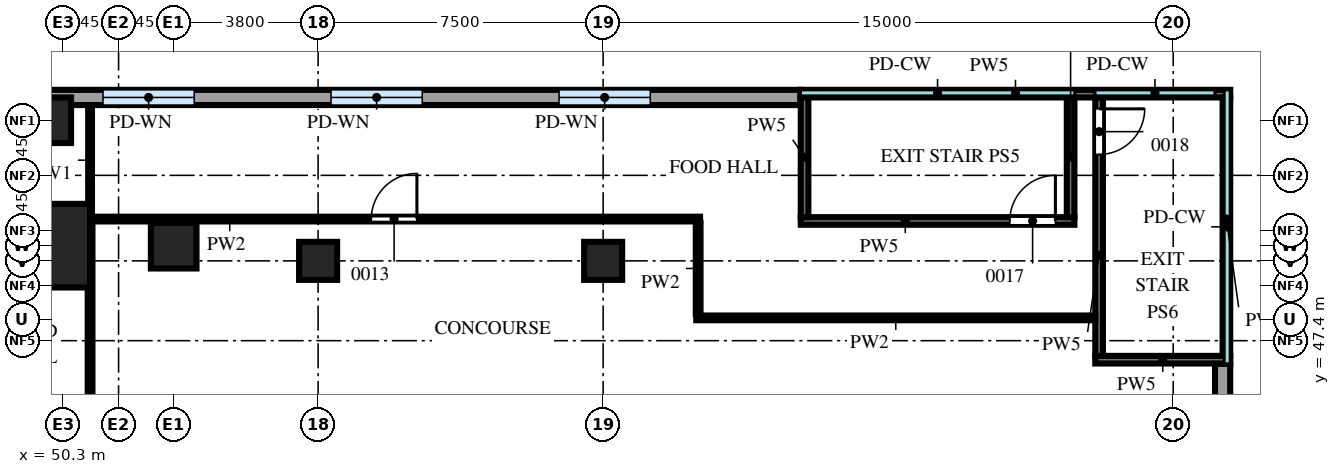
"""IFC4 building model, lengths in metres.
Left out: names, types, materials, properties, quantities, classifications, styles, units other than length and angle.
Written with IfcOpenShell. Run it as: python <this file> out.ifc"""

import sys

from ifc_helpers import new_model, si_unit, direction, frame, frame_2d, origin, origin_2d, place, context, subcontext, project, spatial, rectangle, extrude, source, transform, mapped, element, fill, save


model = new_model("IFC4")
c1 = context("Model", 3, precision=1e-05, world=origin(), true_north=direction((0.0, 1.0)))
c2 = subcontext(c1, "Body", "Model", "MODEL_VIEW")
j1 = project(units=[si_unit("LENGTHUNIT", "METRE"), si_unit("PLANEANGLEUNIT", "RADIAN")], contexts=[c1])
p1 = place(None, origin())
s1 = spatial("IfcSite", under=j1, at=p1, CompositionType="ELEMENT")
p2 = place(p1, origin())
s2 = spatial("IfcBuilding", under=s1, at=p2, CompositionType="ELEMENT")
p3 = place(p2, frame((0.0, 0.0, 18.5)))
s3 = spatial("IfcBuildingStorey", under=s2, at=p3, CompositionType="ELEMENT", Elevation=18.5)
m1 = source(origin(), c2, "Body", "SweptSolid", [
    extrude(rectangle(XDim=2.2, YDim=2.2, at=origin_2d()), origin(), (0.0, 0.0, 1.0), 4.7),
])
p4 = place(p3, frame((49.9, 49.9, 0.0), z_axis=(0.0, 0.0, 1.0), x_axis=(1.0, 0.0, 0.0)))
e1 = element("IfcColumn", 1, at=p4, inside=s3, PredefinedType="COLUMN", context=c2, shape_type="MappedRepresentation", body=[
    mapped(m1, transform((0.0, 0.0, 0.0))),
])
m2 = source(origin(), c2, "Body", "SweptSolid", [
    extrude(rectangle(XDim=1.2, YDim=1.2, at=origin_2d()), origin(), (0.0, 0.0, 1.0), 4.7),
])
for number, where, z_axis, x_axis in (
    (2, (53.2, 49.9, 0.0), (0.0, 0.0, 1.0), (1.0, 0.0, 0.0)),
    (3, (49.9, 53.2, 0.0), (0.0, 0.0, 1.0), (1.0, 0.0, 0.0)),
):
    element("IfcColumn", number, at=place(p3, frame(where, z_axis=z_axis, x_axis=x_axis)), inside=s3, PredefinedType="COLUMN", context=c2, shape_type="MappedRepresentation", body=[
        mapped(m2, transform((0.0, 0.0, 0.0))),
    ])
m3 = source(origin(), c2, "Body", "SweptSolid", [
    extrude(rectangle(XDim=1.0, YDim=1.0, at=origin_2d()), origin(), (0.0, 0.0, 1.0), 4.7),
])
for number, where, z_axis, x_axis in (
    (4, (57.0, 49.5, 0.0), (0.0, 0.0, 1.0), (1.0, 0.0, 0.0)),
    (5, (64.5, 49.5, 0.0), (0.0, 0.0, 1.0), (1.0, 0.0, 0.0)),
):
    element("IfcColumn", number, at=place(p3, frame(where, z_axis=z_axis, x_axis=x_axis)), inside=s3, PredefinedType="COLUMN", context=c2, shape_type="MappedRepresentation", body=[
        mapped(m3, transform((0.0, 0.0, 0.0))),
    ])
m4 = source(origin(), c2, "Body", "SweptSolid", [
    extrude(rectangle(XDim=39.58, YDim=0.4, at=frame_2d((19.79, 0.0))), origin(), (0.0, 0.0, 1.0), 4.7),
])
p5 = place(p3, frame((80.8, 7.21, 0.0), z_axis=(0.0, 0.0, 1.0), x_axis=(0.0, 1.0, 0.0)))
e6 = element("IfcWall", 6, at=p5, inside=s3, PredefinedType="SOLIDWALL", context=c2, shape_type="MappedRepresentation", body=[
    mapped(m4, transform((0.0, 0.0, 0.0))),
])
m5 = source(origin(), c2, "Body", "SweptSolid", [
    extrude(rectangle(XDim=2.4, YDim=2.4, at=frame_2d((1.2, 1.2))), frame((0.0, 0.21, 0.0), z_axis=(0.0, -1.0, 0.0), x_axis=(1.0, 0.0, 0.0)), (0.0, 0.0, 1.0), 0.42),
])
p6 = place(p5, frame((3.6, 0.0, 1.0)))
e7 = element("IfcOpeningElement", 7, at=p6, cuts=e6, PredefinedType="OPENING", context=c2, shape_type="MappedRepresentation", body=[
    mapped(m5, transform((0.0, 0.0, 0.0))),
])
p7 = place(p5, frame((9.6, 0.0, 1.0)))
e8 = element("IfcOpeningElement", 8, at=p7, cuts=e6, PredefinedType="OPENING", context=c2, shape_type="MappedRepresentation", body=[
    mapped(m5, transform((0.0, 0.0, 0.0))),
])
p8 = place(p5, frame((15.6, 0.0, 1.0)))
e9 = element("IfcOpeningElement", 9, at=p8, cuts=e6, PredefinedType="OPENING", context=c2, shape_type="MappedRepresentation", body=[
    mapped(m5, transform((0.0, 0.0, 0.0))),
])
p9 = place(p5, frame((21.6, 0.0, 1.0)))
e10 = element("IfcOpeningElement", 10, at=p9, cuts=e6, PredefinedType="OPENING", context=c2, shape_type="MappedRepresentation", body=[
    mapped(m5, transform((0.0, 0.0, 0.0))),
])
p10 = place(p5, frame((27.6, 0.0, 1.0)))
e11 = element("IfcOpeningElement", 11, at=p10, cuts=e6, PredefinedType="OPENING", context=c2, shape_type="MappedRepresentation", body=[
    mapped(m5, transform((0.0, 0.0, 0.0))),
])
p11 = place(p5, frame((33.6, 0.0, 1.0)))
e12 = element("IfcOpeningElement", 12, at=p11, cuts=e6, PredefinedType="OPENING", context=c2, shape_type="MappedRepresentation", body=[
    mapped(m5, transform((0.0, 0.0, 0.0))),
])
m6 = source(origin(), c2, "Body", "SweptSolid", [
    extrude(rectangle(XDim=28.34, YDim=0.4, at=frame_2d((14.17, 0.0))), origin(), (0.0, 0.0, 1.0), 4.7),
])
p12 = place(p3, frame((69.69, 53.8, 0.0), z_axis=(0.0, 0.0, 1.0), x_axis=(-1.0, 0.0, 0.0)))
e13 = element("IfcWall", 13, at=p12, inside=s3, PredefinedType="SOLIDWALL", context=c2, shape_type="MappedRepresentation", body=[
    mapped(m6, transform((0.0, 0.0, 0.0))),
])
p13 = place(p12, frame((3.95, 0.0, 1.0)))
e14 = element("IfcOpeningElement", 14, at=p13, cuts=e13, PredefinedType="OPENING", context=c2, shape_type="MappedRepresentation", body=[
    mapped(m5, transform((0.0, 0.0, 0.0))),
])
p14 = place(p12, frame((9.95, 0.0, 1.0)))
e15 = element("IfcOpeningElement", 15, at=p14, cuts=e13, PredefinedType="OPENING", context=c2, shape_type="MappedRepresentation", body=[
    mapped(m5, transform((0.0, 0.0, 0.0))),
])
p15 = place(p12, frame((15.95, 0.0, 1.0)))
e16 = element("IfcOpeningElement", 16, at=p15, cuts=e13, PredefinedType="OPENING", context=c2, shape_type="MappedRepresentation", body=[
    mapped(m5, transform((0.0, 0.0, 0.0))),
])
p16 = place(p12, frame((21.95, 0.0, 1.0)))
e17 = element("IfcOpeningElement", 17, at=p16, cuts=e13, PredefinedType="OPENING", context=c2, shape_type="MappedRepresentation", body=[
    mapped(m5, transform((0.0, 0.0, 0.0))),
])
m7 = source(origin(), c2, "Body", "SweptSolid", [
    extrude(rectangle(XDim=7.2, YDim=0.2, at=frame_2d((3.6, 0.0))), origin(), (0.0, 0.0, 1.0), 4.7),
])
p17 = place(p3, frame((69.7, 50.55, 0.0), z_axis=(0.0, 0.0, 1.0), x_axis=(1.0, 0.0, 0.0)))
e18 = element("IfcWall", 18, at=p17, inside=s3, PredefinedType="PARTITIONING", context=c2, shape_type="MappedRepresentation", body=[
    mapped(m7, transform((0.0, 0.0, 0.0))),
])
m8 = source(origin(), c2, "Body", "SweptSolid", [
    extrude(rectangle(XDim=1.2, YDim=2.1, at=frame_2d((0.6, 1.05))), frame((0.0, 0.11, 0.0), z_axis=(0.0, -1.0, 0.0), x_axis=(1.0, 0.0, 0.0)), (0.0, 0.0, 1.0), 0.22),
])
p18 = place(p17, frame((5.5, 0.0, 0.0)))
e19 = element("IfcOpeningElement", 19, at=p18, cuts=e18, PredefinedType="OPENING", context=c2, shape_type="MappedRepresentation", body=[
    mapped(m8, transform((0.0, 0.0, 0.0))),
])
m9 = source(origin(), c2, "Body", "SweptSolid", [
    extrude(rectangle(XDim=11.3, YDim=0.2, at=frame_2d((5.65, 0.0))), origin(), (0.0, 0.0, 1.0), 4.7),
])
p19 = place(p3, frame((69.7, 53.9, 0.0), z_axis=(0.0, 0.0, 1.0), x_axis=(1.0, 0.0, 0.0)))
e20 = element("IfcWall", 20, at=p19, inside=s3, PredefinedType="PARTITIONING", context=c2, shape_type="MappedRepresentation", body=[
    mapped(m9, transform((0.0, 0.0, 0.0))),
])
m10 = source(origin(), c2, "Body", "SweptSolid", [
    extrude(rectangle(XDim=3.15, YDim=0.2, at=frame_2d((1.575, 0.0))), origin(), (0.0, 0.0, 1.0), 4.7),
])
for number, where, z_axis, x_axis in (
    (21, (69.8, 50.65, 0.0), (0.0, 0.0, 1.0), (0.0, 1.0, 0.0)),
    (22, (76.8, 50.65, 0.0), (0.0, 0.0, 1.0), (0.0, 1.0, 0.0)),
):
    element("IfcWall", number, at=place(p3, frame(where, z_axis=z_axis, x_axis=x_axis)), inside=s3, PredefinedType="PARTITIONING", context=c2, shape_type="MappedRepresentation", body=[
        mapped(m10, transform((0.0, 0.0, 0.0))),
    ])
m11 = source(origin(), c2, "Body", "SweptSolid", [
    extrude(rectangle(XDim=3.55, YDim=0.2, at=frame_2d((1.775, 0.0))), origin(), (0.0, 0.0, 1.0), 4.7),
])
p20 = place(p3, frame((77.45, 46.9, 0.0), z_axis=(0.0, 0.0, 1.0), x_axis=(1.0, 0.0, 0.0)))
e23 = element("IfcWall", 23, at=p20, inside=s3, PredefinedType="PARTITIONING", context=c2, shape_type="MappedRepresentation", body=[
    mapped(m11, transform((0.0, 0.0, 0.0))),
])
m12 = source(origin(), c2, "Body", "SweptSolid", [
    extrude(rectangle(XDim=6.8, YDim=0.2, at=frame_2d((3.4, 0.0))), origin(), (0.0, 0.0, 1.0), 4.7),
])
p21 = place(p3, frame((77.55, 47.0, 0.0), z_axis=(0.0, 0.0, 1.0), x_axis=(0.0, 1.0, 0.0)))
e24 = element("IfcWall", 24, at=p21, inside=s3, PredefinedType="PARTITIONING", context=c2, shape_type="MappedRepresentation", body=[
    mapped(m12, transform((0.0, 0.0, 0.0))),
])
p22 = place(p21, frame((5.3, 0.0, 0.0)))
e25 = element("IfcOpeningElement", 25, at=p22, cuts=e24, PredefinedType="OPENING", context=c2, shape_type="MappedRepresentation", body=[
    mapped(m8, transform((0.0, 0.0, 0.0))),
])
p23 = place(p3, frame((80.9, 47.0, 0.0), z_axis=(0.0, 0.0, 1.0), x_axis=(0.0, 1.0, 0.0)))
e26 = element("IfcWall", 26, at=p23, inside=s3, PredefinedType="PARTITIONING", context=c2, shape_type="MappedRepresentation", body=[
    mapped(m12, transform((0.0, 0.0, 0.0))),
])
m13 = source(origin(), c2, "Body", "SweptSolid", [
    extrude(rectangle(XDim=12.9, YDim=0.125, at=frame_2d((6.45, 0.0))), origin(), (0.0, 0.0, 1.0), 4.7),
])
p24 = place(p3, frame((51.0, 37.6, 0.0), z_axis=(0.0, 0.0, 1.0), x_axis=(0.0, 1.0, 0.0)))
e27 = element("IfcWall", 27, at=p24, inside=s3, PredefinedType="PARTITIONING", context=c2, shape_type="MappedRepresentation", body=[
    mapped(m13, transform((0.0, 0.0, 0.0))),
])
m14 = source(origin(), c2, "Body", "SweptSolid", [
    extrude(rectangle(XDim=1.2, YDim=2.1, at=frame_2d((0.6, 1.05))), frame((0.0, 0.073, 0.0), z_axis=(0.0, -1.0, 0.0), x_axis=(1.0, 0.0, 0.0)), (0.0, 0.0, 1.0), 0.145),
])
p25 = place(p24, frame((5.85, 0.0, 0.0)))
e28 = element("IfcOpeningElement", 28, at=p25, cuts=e27, PredefinedType="OPENING", context=c2, shape_type="MappedRepresentation", body=[
    mapped(m14, transform((0.0, 0.0, 0.0))),
])
m15 = source(origin(), c2, "Body", "SweptSolid", [
    extrude(rectangle(XDim=10.5, YDim=0.125, at=frame_2d((5.25, 0.0))), origin(), (0.0, 0.0, 1.0), 4.7),
])
p26 = place(p3, frame((66.95, 48.0, 0.0), z_axis=(0.0, 0.0, 1.0), x_axis=(1.0, 0.0, 0.0)))
e29 = element("IfcWall", 29, at=p26, inside=s3, PredefinedType="PARTITIONING", context=c2, shape_type="MappedRepresentation", body=[
    mapped(m15, transform((0.0, 0.0, 0.0))),
])
m16 = source(origin(), c2, "Body", "SweptSolid", [
    extrude(rectangle(XDim=2.4, YDim=0.125, at=frame_2d((1.2, 0.0))), origin(), (0.0, 0.0, 1.0), 4.7),
])
p27 = place(p3, frame((67.0, 48.1, 0.0), z_axis=(0.0, 0.0, 1.0), x_axis=(0.0, 1.0, 0.0)))
e30 = element("IfcWall", 30, at=p27, inside=s3, PredefinedType="PARTITIONING", context=c2, shape_type="MappedRepresentation", body=[
    mapped(m16, transform((0.0, 0.0, 0.0))),
])
m17 = source(origin(), c2, "Body", "SweptSolid", [
    extrude(rectangle(XDim=16.1, YDim=0.125, at=frame_2d((8.05, 0.0))), origin(), (0.0, 0.0, 1.0), 4.7),
])
p28 = place(p3, frame((50.95, 50.6, 0.0), z_axis=(0.0, 0.0, 1.0), x_axis=(1.0, 0.0, 0.0)))
e31 = element("IfcWall", 31, at=p28, inside=s3, PredefinedType="PARTITIONING", context=c2, shape_type="MappedRepresentation", body=[
    mapped(m17, transform((0.0, 0.0, 0.0))),
])
p29 = place(p28, frame((7.45, 0.0, 0.0)))
e32 = element("IfcOpeningElement", 32, at=p29, cuts=e31, PredefinedType="OPENING", context=c2, shape_type="MappedRepresentation", body=[
    mapped(m14, transform((0.0, 0.0, 0.0))),
])
m18 = source(origin(), c2, "Body", "SweptSolid", [
    extrude(rectangle(XDim=2.9, YDim=0.1, at=frame_2d((1.45, 0.0))), origin(), (0.0, 0.0, 1.0), 4.7),
])
p30 = place(p3, frame((51.0, 50.7, 0.0), z_axis=(0.0, 0.0, 1.0), x_axis=(0.0, 1.0, 0.0)))
e33 = element("IfcWall", 33, at=p30, inside=s3, PredefinedType="PARTITIONING", context=c2, shape_type="MappedRepresentation", body=[
    mapped(m18, transform((0.0, 0.0, 0.0))),
])
m19 = source(origin(), c2, "Body", "SweptSolid", [
    extrude(rectangle(XDim=2.4, YDim=2.4, at=frame_2d((1.2, 1.2))), frame((0.0, 0.03, 0.0), z_axis=(0.0, -1.0, 0.0), x_axis=(1.0, 0.0, 0.0)), (0.0, 0.0, 1.0), 0.06),
])
p31 = place(p13, origin())
e34 = element("IfcWindow", 34, at=p31, inside=s3, PartitioningType="SINGLE_PANEL", PredefinedType="WINDOW", context=c2, shape_type="MappedRepresentation", body=[
    mapped(m19, transform((0.0, 0.0, 0.0))),
])
fill(e14, e34)
p32 = place(p14, origin())
e35 = element("IfcWindow", 35, at=p32, inside=s3, PartitioningType="SINGLE_PANEL", PredefinedType="WINDOW", context=c2, shape_type="MappedRepresentation", body=[
    mapped(m19, transform((0.0, 0.0, 0.0))),
])
fill(e15, e35)
p33 = place(p15, origin())
e36 = element("IfcWindow", 36, at=p33, inside=s3, PartitioningType="SINGLE_PANEL", PredefinedType="WINDOW", context=c2, shape_type="MappedRepresentation", body=[
    mapped(m19, transform((0.0, 0.0, 0.0))),
])
fill(e16, e36)
m20 = source(origin(), c2, "Body", "SweptSolid", [
    extrude(rectangle(XDim=1.2, YDim=2.1, at=frame_2d((0.6, 1.05))), frame((0.0, 0.025, 0.0), z_axis=(0.0, -1.0, 0.0), x_axis=(1.0, 0.0, 0.0)), (0.0, 0.0, 1.0), 0.05),
])
p34 = place(p29, origin())
e37 = element("IfcDoor", 37, at=p34, inside=s3, OperationType="SINGLE_SWING_LEFT", PredefinedType="DOOR", context=c2, shape_type="MappedRepresentation", body=[
    mapped(m20, transform((0.0, 0.0, 0.0))),
])
fill(e32, e37)
p35 = place(p18, origin())
e38 = element("IfcDoor", 38, at=p35, inside=s3, OperationType="SINGLE_SWING_LEFT", PredefinedType="DOOR", context=c2, shape_type="MappedRepresentation", body=[
    mapped(m20, transform((0.0, 0.0, 0.0))),
])
fill(e19, e38)
p36 = place(p22, origin())
e39 = element("IfcDoor", 39, at=p36, inside=s3, OperationType="SINGLE_SWING_RIGHT", PredefinedType="DOOR", context=c2, shape_type="MappedRepresentation", body=[
    mapped(m20, transform((0.0, 0.0, 0.0))),
])
fill(e25, e39)
save(model, sys.argv[1])
